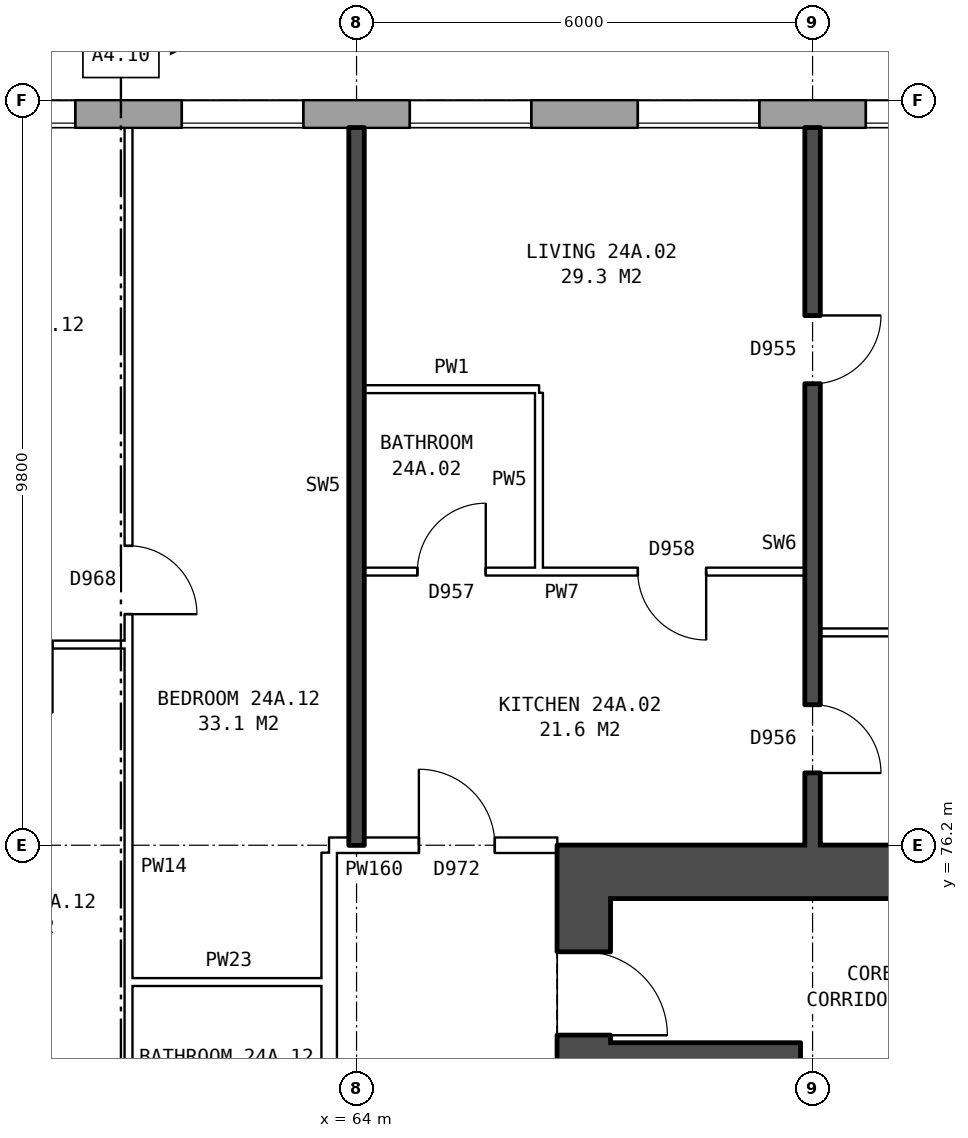
"""IFC4 building model, lengths in metres.
Left out: names, types, materials, properties, quantities, classifications, styles, units other than length and angle.
Written with IfcOpenShell. Run it as: python <this file> out.ifc"""

import sys

from ifc_helpers import new_model, si_unit, direction, frame, frame_2d, origin, place, context, subcontext, project, spatial, rectangle, extrude, element, fill, save


model = new_model("IFC4")
c1 = context("Model", 3, precision=1e-05, world=origin(), true_north=direction((0.0, 1.0)))
c2 = subcontext(c1, "Body", "Model", "MODEL_VIEW")
j1 = project(units=[si_unit("LENGTHUNIT", "METRE"), si_unit("PLANEANGLEUNIT", "RADIAN")], contexts=[c1])
p1 = place(None, origin())
s1 = spatial("IfcSite", under=j1, at=p1, CompositionType="ELEMENT")
p2 = place(p1, origin())
s2 = spatial("IfcBuilding", under=s1, at=p2, CompositionType="ELEMENT")
p3 = place(p2, frame((0.0, 0.0, 87.1)))
s3 = spatial("IfcBuildingStorey", under=s2, at=p3, CompositionType="ELEMENT", Elevation=87.1)
p4 = place(p3, frame((72.925, 85.82, 0.0), z_axis=(0.0, 0.0, 1.0), x_axis=(-1.0, 0.0, 0.0)))
e1 = element("IfcWall", 1, at=p4, inside=s3, PredefinedType="STANDARD", context=c2, shape_type="SweptSolid", body=[
    extrude(rectangle(XDim=46.601, YDim=0.36, at=frame_2d((23.3, 0.0))), origin(), (0.0, 0.0, 1.0), 2.85),
])
p5 = place(p4, frame((0.625, 0.0, 0.8)))
e2 = element("IfcOpeningElement", 2, at=p5, cuts=e1, PredefinedType="OPENING", context=c2, shape_type="SweptSolid", body=[
    extrude(rectangle(XDim=1.6, YDim=1.8, at=frame_2d((0.8, 0.9))), frame((0.0, 0.19, 0.0), z_axis=(0.0, -1.0, 0.0), x_axis=(1.0, 0.0, 0.0)), (0.0, 0.0, 1.0), 0.38),
])
p6 = place(p4, frame((3.625, 0.0, 0.8)))
e3 = element("IfcOpeningElement", 3, at=p6, cuts=e1, PredefinedType="OPENING", context=c2, shape_type="SweptSolid", body=[
    extrude(rectangle(XDim=1.6, YDim=1.8, at=frame_2d((0.8, 0.9))), frame((0.0, 0.19, 0.0), z_axis=(0.0, -1.0, 0.0), x_axis=(1.0, 0.0, 0.0)), (0.0, 0.0, 1.0), 0.38),
])
p7 = place(p4, frame((6.625, 0.0, 0.8)))
e4 = element("IfcOpeningElement", 4, at=p7, cuts=e1, PredefinedType="OPENING", context=c2, shape_type="SweptSolid", body=[
    extrude(rectangle(XDim=1.6, YDim=1.8, at=frame_2d((0.8, 0.9))), frame((0.0, 0.19, 0.0), z_axis=(0.0, -1.0, 0.0), x_axis=(1.0, 0.0, 0.0)), (0.0, 0.0, 1.0), 0.38),
])
p8 = place(p4, frame((9.625, 0.0, 0.8)))
e5 = element("IfcOpeningElement", 5, at=p8, cuts=e1, PredefinedType="OPENING", context=c2, shape_type="SweptSolid", body=[
    extrude(rectangle(XDim=1.6, YDim=1.8, at=frame_2d((0.8, 0.9))), frame((0.0, 0.19, 0.0), z_axis=(0.0, -1.0, 0.0), x_axis=(1.0, 0.0, 0.0)), (0.0, 0.0, 1.0), 0.38),
])
p9 = place(p4, frame((12.625, 0.0, 0.8)))
e6 = element("IfcOpeningElement", 6, at=p9, cuts=e1, PredefinedType="OPENING", context=c2, shape_type="SweptSolid", body=[
    extrude(rectangle(XDim=1.6, YDim=1.8, at=frame_2d((0.8, 0.9))), frame((0.0, 0.19, 0.0), z_axis=(0.0, -1.0, 0.0), x_axis=(1.0, 0.0, 0.0)), (0.0, 0.0, 1.0), 0.38),
])
p10 = place(p4, frame((15.625, 0.0, 0.8)))
e7 = element("IfcOpeningElement", 7, at=p10, cuts=e1, PredefinedType="OPENING", context=c2, shape_type="SweptSolid", body=[
    extrude(rectangle(XDim=1.6, YDim=1.8, at=frame_2d((0.8, 0.9))), frame((0.0, 0.19, 0.0), z_axis=(0.0, -1.0, 0.0), x_axis=(1.0, 0.0, 0.0)), (0.0, 0.0, 1.0), 0.38),
])
p11 = place(p4, frame((18.625, 0.0, 0.8)))
e8 = element("IfcOpeningElement", 8, at=p11, cuts=e1, PredefinedType="OPENING", context=c2, shape_type="SweptSolid", body=[
    extrude(rectangle(XDim=1.6, YDim=1.8, at=frame_2d((0.8, 0.9))), frame((0.0, 0.19, 0.0), z_axis=(0.0, -1.0, 0.0), x_axis=(1.0, 0.0, 0.0)), (0.0, 0.0, 1.0), 0.38),
])
p12 = place(p4, frame((22.025, 0.0, 0.15)))
e9 = element("IfcOpeningElement", 9, at=p12, cuts=e1, PredefinedType="OPENING", context=c2, shape_type="SweptSolid", body=[
    extrude(rectangle(XDim=0.6, YDim=0.9, at=frame_2d((0.3, 0.45))), frame((0.0, 0.19, 0.0), z_axis=(0.0, -1.0, 0.0), x_axis=(1.0, 0.0, 0.0)), (0.0, 0.0, 1.0), 0.38),
])
p13 = place(p4, frame((25.475, 0.0, 1.4)))
e10 = element("IfcOpeningElement", 10, at=p13, cuts=e1, PredefinedType="OPENING", context=c2, shape_type="SweptSolid", body=[
    extrude(rectangle(XDim=1.2, YDim=1.2, at=frame_2d((0.6, 0.6))), frame((0.0, 0.19, 0.0), z_axis=(0.0, -1.0, 0.0), x_axis=(1.0, 0.0, 0.0)), (0.0, 0.0, 1.0), 0.38),
])
p14 = place(p4, frame((27.625, 0.0, 0.8)))
e11 = element("IfcOpeningElement", 11, at=p14, cuts=e1, PredefinedType="OPENING", context=c2, shape_type="SweptSolid", body=[
    extrude(rectangle(XDim=1.6, YDim=1.8, at=frame_2d((0.8, 0.9))), frame((0.0, 0.19, 0.0), z_axis=(0.0, -1.0, 0.0), x_axis=(1.0, 0.0, 0.0)), (0.0, 0.0, 1.0), 0.38),
])
p15 = place(p4, frame((30.625, 0.0, 0.8)))
e12 = element("IfcOpeningElement", 12, at=p15, cuts=e1, PredefinedType="OPENING", context=c2, shape_type="SweptSolid", body=[
    extrude(rectangle(XDim=1.6, YDim=1.8, at=frame_2d((0.8, 0.9))), frame((0.0, 0.19, 0.0), z_axis=(0.0, -1.0, 0.0), x_axis=(1.0, 0.0, 0.0)), (0.0, 0.0, 1.0), 0.38),
])
p16 = place(p4, frame((33.625, 0.0, 0.8)))
e13 = element("IfcOpeningElement", 13, at=p16, cuts=e1, PredefinedType="OPENING", context=c2, shape_type="SweptSolid", body=[
    extrude(rectangle(XDim=1.6, YDim=1.8, at=frame_2d((0.8, 0.9))), frame((0.0, 0.19, 0.0), z_axis=(0.0, -1.0, 0.0), x_axis=(1.0, 0.0, 0.0)), (0.0, 0.0, 1.0), 0.38),
])
p17 = place(p4, frame((36.625, 0.0, 0.8)))
e14 = element("IfcOpeningElement", 14, at=p17, cuts=e1, PredefinedType="OPENING", context=c2, shape_type="SweptSolid", body=[
    extrude(rectangle(XDim=1.6, YDim=1.8, at=frame_2d((0.8, 0.9))), frame((0.0, 0.19, 0.0), z_axis=(0.0, -1.0, 0.0), x_axis=(1.0, 0.0, 0.0)), (0.0, 0.0, 1.0), 0.38),
])
p18 = place(p4, frame((39.625, 0.0, 0.8)))
e15 = element("IfcOpeningElement", 15, at=p18, cuts=e1, PredefinedType="OPENING", context=c2, shape_type="SweptSolid", body=[
    extrude(rectangle(XDim=1.6, YDim=1.8, at=frame_2d((0.8, 0.9))), frame((0.0, 0.19, 0.0), z_axis=(0.0, -1.0, 0.0), x_axis=(1.0, 0.0, 0.0)), (0.0, 0.0, 1.0), 0.38),
])
p19 = place(p4, frame((42.625, 0.0, 0.8)))
e16 = element("IfcOpeningElement", 16, at=p19, cuts=e1, PredefinedType="OPENING", context=c2, shape_type="SweptSolid", body=[
    extrude(rectangle(XDim=1.6, YDim=1.8, at=frame_2d((0.8, 0.9))), frame((0.0, 0.19, 0.0), z_axis=(0.0, -1.0, 0.0), x_axis=(1.0, 0.0, 0.0)), (0.0, 0.0, 1.0), 0.38),
])
p20 = place(p4, frame((22.925, 0.0, 0.25)))
e17 = element("IfcOpeningElement", 17, at=p20, cuts=e1, PredefinedType="OPENING", context=c2, shape_type="SweptSolid", body=[
    extrude(rectangle(XDim=0.8, YDim=1.5, at=frame_2d((0.4, 0.75))), frame((0.0, 0.19, 0.0), z_axis=(0.0, -1.0, 0.0), x_axis=(1.0, 0.0, 0.0)), (0.0, 0.0, 1.0), 0.38),
])
p21 = place(p3, frame((66.99, 64.5, 0.0), z_axis=(0.0, 0.0, 1.0), x_axis=(0.0, 1.0, 0.0)))
e18 = element("IfcWall", 18, at=p21, inside=s3, PredefinedType="SHEAR", context=c2, shape_type="SweptSolid", body=[
    extrude(rectangle(XDim=11.0, YDim=0.7, at=frame_2d((5.5, 0.0))), origin(), (0.0, 0.0, 1.0), 2.85),
])
p22 = place(p21, frame((0.625, 0.0, 0.0)))
e19 = element("IfcOpeningElement", 19, at=p22, cuts=e18, PredefinedType="OPENING", context=c2, shape_type="SweptSolid", body=[
    extrude(rectangle(XDim=1.1, YDim=2.1, at=frame_2d((0.55, 1.05))), frame((0.0, 0.36, 0.0), z_axis=(0.0, -1.0, 0.0), x_axis=(1.0, 0.0, 0.0)), (0.0, 0.0, 1.0), 0.72),
])
p23 = place(p21, frame((9.2, 0.0, 0.0)))
e20 = element("IfcOpeningElement", 20, at=p23, cuts=e18, PredefinedType="OPENING", context=c2, shape_type="SweptSolid", body=[
    extrude(rectangle(XDim=1.1, YDim=2.1, at=frame_2d((0.55, 1.05))), frame((0.0, 0.36, 0.0), z_axis=(0.0, -1.0, 0.0), x_axis=(1.0, 0.0, 0.0)), (0.0, 0.0, 1.0), 0.72),
])
p24 = place(p3, frame((66.64, 75.85, 0.0), z_axis=(0.0, 0.0, 1.0), x_axis=(1.0, 0.0, 0.0)))
e21 = element("IfcWall", 21, at=p24, inside=s3, PredefinedType="SHEAR", context=c2, shape_type="SweptSolid", body=[
    extrude(rectangle(XDim=9.0, YDim=0.7, at=frame_2d((4.5, 0.0))), origin(), (0.0, 0.0, 1.0), 2.85),
])
p25 = place(p3, frame((67.34, 73.45, 0.0), z_axis=(0.0, 0.0, 1.0), x_axis=(1.0, 0.0, 0.0)))
e22 = element("IfcWall", 22, at=p25, inside=s3, PredefinedType="SHEAR", context=c2, shape_type="SweptSolid", body=[
    extrude(rectangle(XDim=2.2, YDim=0.3, at=frame_2d((1.1, 0.0))), origin(), (0.0, 0.0, 1.0), 2.85),
])
p26 = place(p3, frame((69.69, 67.0, 0.0), z_axis=(0.0, 0.0, 1.0), x_axis=(0.0, 1.0, 0.0)))
e23 = element("IfcWall", 23, at=p26, inside=s3, PredefinedType="SHEAR", context=c2, shape_type="SweptSolid", body=[
    extrude(rectangle(XDim=6.6, YDim=0.3, at=frame_2d((3.3, 0.0))), origin(), (0.0, 0.0, 1.0), 2.85),
])
p27 = place(p3, frame((63.64, 63.9, 0.0), z_axis=(0.0, 0.0, 1.0), x_axis=(0.0, 1.0, 0.0)))
e24 = element("IfcWall", 24, at=p27, inside=s3, PredefinedType="PARTITIONING", context=c2, shape_type="SweptSolid", body=[
    extrude(rectangle(XDim=12.2, YDim=0.2, at=frame_2d((6.1, 0.0))), origin(), (0.0, 0.0, 1.0), 2.85),
])
p28 = place(p27, frame((5.1, 0.0, 0.0)))
e25 = element("IfcOpeningElement", 25, at=p28, cuts=e24, PredefinedType="OPENING", context=c2, shape_type="SweptSolid", body=[
    extrude(rectangle(XDim=2.0, YDim=2.1, at=frame_2d((1.0, 1.05))), frame((0.0, 0.11, 0.0), z_axis=(0.0, -1.0, 0.0), x_axis=(1.0, 0.0, 0.0)), (0.0, 0.0, 1.0), 0.22),
])
p29 = place(p3, frame((61.0, 74.4, 0.0), z_axis=(0.0, 0.0, 1.0), x_axis=(1.0, 0.0, 0.0)))
e26 = element("IfcWall", 26, at=p29, inside=s3, PredefinedType="PARTITIONING", context=c2, shape_type="SweptSolid", body=[
    extrude(rectangle(XDim=2.64, YDim=0.1, at=frame_2d((1.32, 0.0))), origin(), (0.0, 0.0, 1.0), 2.85),
])
p30 = place(p3, frame((63.64, 76.2, 0.0), z_axis=(0.0, 0.0, 1.0), x_axis=(1.0, 0.0, 0.0)))
e27 = element("IfcWall", 27, at=p30, inside=s3, PredefinedType="PARTITIONING", context=c2, shape_type="SweptSolid", body=[
    extrude(rectangle(XDim=3.0, YDim=0.2, at=frame_2d((1.5, 0.0))), origin(), (0.0, 0.0, 1.0), 2.85),
])
p31 = place(p30, frame((1.18, 0.0, 0.0)))
e28 = element("IfcOpeningElement", 28, at=p31, cuts=e27, PredefinedType="OPENING", context=c2, shape_type="SweptSolid", body=[
    extrude(rectangle(XDim=1.0, YDim=2.1, at=frame_2d((0.5, 1.05))), frame((0.0, 0.11, 0.0), z_axis=(0.0, -1.0, 0.0), x_axis=(1.0, 0.0, 0.0)), (0.0, 0.0, 1.0), 0.22),
])
p32 = place(p3, frame((58.1, 78.84, 0.0), z_axis=(0.0, 0.0, 1.0), x_axis=(1.0, 0.0, 0.0)))
e29 = element("IfcWall", 29, at=p32, inside=s3, PredefinedType="PARTITIONING", context=c2, shape_type="SweptSolid", body=[
    extrude(rectangle(XDim=2.9, YDim=0.1, at=frame_2d((1.45, 0.0))), origin(), (0.0, 0.0, 1.0), 2.85),
])
p33 = place(p32, frame((1.0, 0.0, 0.0)))
e30 = element("IfcOpeningElement", 30, at=p33, cuts=e29, PredefinedType="OPENING", context=c2, shape_type="SweptSolid", body=[
    extrude(rectangle(XDim=0.9, YDim=2.1, at=frame_2d((0.45, 1.05))), frame((0.0, 0.06, 0.0), z_axis=(0.0, -1.0, 0.0), x_axis=(1.0, 0.0, 0.0)), (0.0, 0.0, 1.0), 0.12),
])
p34 = place(p3, frame((70.1, 79.0, 0.0), z_axis=(0.0, 0.0, 1.0), x_axis=(1.0, 0.0, 0.0)))
e31 = element("IfcWall", 31, at=p34, inside=s3, PredefinedType="PARTITIONING", context=c2, shape_type="SweptSolid", body=[
    extrude(rectangle(XDim=5.54, YDim=0.1, at=frame_2d((2.77, 0.0))), origin(), (0.0, 0.0, 1.0), 2.85),
])
p35 = place(p3, frame((64.1, 79.8, 0.0), z_axis=(0.0, 0.0, 1.0), x_axis=(1.0, 0.0, 0.0)))
e32 = element("IfcWall", 32, at=p35, inside=s3, PredefinedType="PARTITIONING", context=c2, shape_type="SweptSolid", body=[
    extrude(rectangle(XDim=5.8, YDim=0.1, at=frame_2d((2.9, 0.0))), origin(), (0.0, 0.0, 1.0), 2.85),
])
p36 = place(p35, frame((3.6, 0.0, 0.0)))
e33 = element("IfcOpeningElement", 33, at=p36, cuts=e32, PredefinedType="OPENING", context=c2, shape_type="SweptSolid", body=[
    extrude(rectangle(XDim=0.9, YDim=2.1, at=frame_2d((0.45, 1.05))), frame((0.0, 0.06, 0.0), z_axis=(0.0, -1.0, 0.0), x_axis=(1.0, 0.0, 0.0)), (0.0, 0.0, 1.0), 0.12),
])
p37 = place(p35, frame((0.7, 0.0, 0.0)))
e34 = element("IfcOpeningElement", 34, at=p37, cuts=e32, PredefinedType="OPENING", context=c2, shape_type="SweptSolid", body=[
    extrude(rectangle(XDim=0.9, YDim=2.1, at=frame_2d((0.45, 1.05))), frame((0.0, 0.06, 0.0), z_axis=(0.0, -1.0, 0.0), x_axis=(1.0, 0.0, 0.0)), (0.0, 0.0, 1.0), 0.12),
])
p38 = place(p3, frame((64.1, 82.2, 0.0), z_axis=(0.0, 0.0, 1.0), x_axis=(1.0, 0.0, 0.0)))
e35 = element("IfcWall", 35, at=p38, inside=s3, PredefinedType="PARTITIONING", context=c2, shape_type="SweptSolid", body=[
    extrude(rectangle(XDim=2.3, YDim=0.1, at=frame_2d((1.15, 0.0))), origin(), (0.0, 0.0, 1.0), 2.85),
])
p39 = place(p3, frame((61.0, 71.3, 0.0), z_axis=(0.0, 0.0, 1.0), x_axis=(0.0, 1.0, 0.0)))
e36 = element("IfcWall", 36, at=p39, inside=s3, PredefinedType="PARTITIONING", context=c2, shape_type="SweptSolid", body=[
    extrude(rectangle(XDim=14.34, YDim=0.1, at=frame_2d((7.17, 0.0))), origin(), (0.0, 0.0, 1.0), 2.85),
])
p40 = place(p39, frame((7.94, 0.0, 0.0)))
e37 = element("IfcOpeningElement", 37, at=p40, cuts=e36, PredefinedType="OPENING", context=c2, shape_type="SweptSolid", body=[
    extrude(rectangle(XDim=0.9, YDim=2.1, at=frame_2d((0.45, 1.05))), frame((0.0, 0.06, 0.0), z_axis=(0.0, -1.0, 0.0), x_axis=(1.0, 0.0, 0.0)), (0.0, 0.0, 1.0), 0.12),
])
p41 = place(p39, frame((0.4, 0.0, 0.0)))
e38 = element("IfcOpeningElement", 38, at=p41, cuts=e36, PredefinedType="OPENING", context=c2, shape_type="SweptSolid", body=[
    extrude(rectangle(XDim=0.9, YDim=2.1, at=frame_2d((0.45, 1.05))), frame((0.0, 0.06, 0.0), z_axis=(0.0, -1.0, 0.0), x_axis=(1.0, 0.0, 0.0)), (0.0, 0.0, 1.0), 0.12),
])
p42 = place(p3, frame((64.0, 76.2, 0.0), z_axis=(0.0, 0.0, 1.0), x_axis=(0.0, 1.0, 0.0)))
e39 = element("IfcWall", 39, at=p42, inside=s3, PredefinedType="SOLIDWALL", context=c2, shape_type="SweptSolid", body=[
    extrude(rectangle(XDim=9.44, YDim=0.2, at=frame_2d((4.72, 0.0))), origin(), (0.0, 0.0, 1.0), 2.85),
])
p43 = place(p3, frame((66.4, 79.85, 0.0), z_axis=(0.0, 0.0, 1.0), x_axis=(0.0, 1.0, 0.0)))
e40 = element("IfcWall", 40, at=p43, inside=s3, PredefinedType="PARTITIONING", context=c2, shape_type="SweptSolid", body=[
    extrude(rectangle(XDim=2.3, YDim=0.1, at=frame_2d((1.15, 0.0))), origin(), (0.0, 0.0, 1.0), 2.85),
])
p44 = place(p3, frame((70.0, 76.2, 0.0), z_axis=(0.0, 0.0, 1.0), x_axis=(0.0, 1.0, 0.0)))
e41 = element("IfcWall", 41, at=p44, inside=s3, PredefinedType="SOLIDWALL", context=c2, shape_type="SweptSolid", body=[
    extrude(rectangle(XDim=9.44, YDim=0.2, at=frame_2d((4.72, 0.0))), origin(), (0.0, 0.0, 1.0), 2.85),
])
p45 = place(p44, frame((6.07, 0.0, 0.0)))
e42 = element("IfcOpeningElement", 42, at=p45, cuts=e41, PredefinedType="OPENING", context=c2, shape_type="SweptSolid", body=[
    extrude(rectangle(XDim=0.9, YDim=2.1, at=frame_2d((0.45, 1.05))), frame((0.0, 0.11, 0.0), z_axis=(0.0, -1.0, 0.0), x_axis=(1.0, 0.0, 0.0)), (0.0, 0.0, 1.0), 0.22),
])
p46 = place(p44, frame((0.95, 0.0, 0.0)))
e43 = element("IfcOpeningElement", 43, at=p46, cuts=e41, PredefinedType="OPENING", context=c2, shape_type="SweptSolid", body=[
    extrude(rectangle(XDim=0.9, YDim=2.1, at=frame_2d((0.45, 1.05))), frame((0.0, 0.11, 0.0), z_axis=(0.0, -1.0, 0.0), x_axis=(1.0, 0.0, 0.0)), (0.0, 0.0, 1.0), 0.22),
])
p47 = place(p5, origin())
e44 = element("IfcWindow", 44, at=p47, inside=s3, PartitioningType="SINGLE_PANEL", PredefinedType="WINDOW", context=c2, shape_type="SweptSolid", body=[
    extrude(rectangle(XDim=1.6, YDim=1.8, at=frame_2d((0.8, 0.9))), frame((0.0, 0.15, 0.0), z_axis=(0.0, -1.0, 0.0), x_axis=(1.0, 0.0, 0.0)), (0.0, 0.0, 1.0), 0.06),
])
fill(e2, e44)
p48 = place(p6, origin())
e45 = element("IfcWindow", 45, at=p48, inside=s3, PartitioningType="SINGLE_PANEL", PredefinedType="WINDOW", context=c2, shape_type="SweptSolid", body=[
    extrude(rectangle(XDim=1.6, YDim=1.8, at=frame_2d((0.8, 0.9))), frame((0.0, 0.15, 0.0), z_axis=(0.0, -1.0, 0.0), x_axis=(1.0, 0.0, 0.0)), (0.0, 0.0, 1.0), 0.06),
])
fill(e3, e45)
p49 = place(p7, origin())
e46 = element("IfcWindow", 46, at=p49, inside=s3, PartitioningType="SINGLE_PANEL", PredefinedType="WINDOW", context=c2, shape_type="SweptSolid", body=[
    extrude(rectangle(XDim=1.6, YDim=1.8, at=frame_2d((0.8, 0.9))), frame((0.0, 0.15, 0.0), z_axis=(0.0, -1.0, 0.0), x_axis=(1.0, 0.0, 0.0)), (0.0, 0.0, 1.0), 0.06),
])
fill(e4, e46)
p50 = place(p8, origin())
e47 = element("IfcWindow", 47, at=p50, inside=s3, PartitioningType="SINGLE_PANEL", PredefinedType="WINDOW", context=c2, shape_type="SweptSolid", body=[
    extrude(rectangle(XDim=1.6, YDim=1.8, at=frame_2d((0.8, 0.9))), frame((0.0, 0.15, 0.0), z_axis=(0.0, -1.0, 0.0), x_axis=(1.0, 0.0, 0.0)), (0.0, 0.0, 1.0), 0.06),
])
fill(e5, e47)
p51 = place(p9, origin())
e48 = element("IfcWindow", 48, at=p51, inside=s3, PartitioningType="SINGLE_PANEL", PredefinedType="WINDOW", context=c2, shape_type="SweptSolid", body=[
    extrude(rectangle(XDim=1.6, YDim=1.8, at=frame_2d((0.8, 0.9))), frame((0.0, 0.15, 0.0), z_axis=(0.0, -1.0, 0.0), x_axis=(1.0, 0.0, 0.0)), (0.0, 0.0, 1.0), 0.06),
])
fill(e6, e48)
p52 = place(p23, frame((1.1, 0.0, 0.0), z_axis=(0.0, 0.0, 1.0), x_axis=(-1.0, 0.0, 0.0)))
e49 = element("IfcDoor", 49, at=p52, inside=s3, OperationType="SINGLE_SWING_RIGHT", PredefinedType="DOOR", context=c2, shape_type="SweptSolid", body=[
    extrude(rectangle(XDim=1.1, YDim=2.1, at=frame_2d((0.55, 1.05))), frame((0.0, 0.335, 0.0), z_axis=(0.0, -1.0, 0.0), x_axis=(1.0, 0.0, 0.0)), (0.0, 0.0, 1.0), 0.05),
])
fill(e20, e49)
p53 = place(p45, frame((0.9, 0.0, 0.0), z_axis=(0.0, 0.0, 1.0), x_axis=(-1.0, 0.0, 0.0)))
e50 = element("IfcDoor", 50, at=p53, inside=s3, OperationType="SINGLE_SWING_LEFT", PredefinedType="DOOR", context=c2, shape_type="SweptSolid", body=[
    extrude(rectangle(XDim=0.9, YDim=2.1, at=frame_2d((0.45, 1.05))), frame((0.0, 0.025, 0.0), z_axis=(0.0, -1.0, 0.0), x_axis=(1.0, 0.0, 0.0)), (0.0, 0.0, 1.0), 0.05),
])
fill(e42, e50)
p54 = place(p46, frame((0.9, 0.0, 0.0), z_axis=(0.0, 0.0, 1.0), x_axis=(-1.0, 0.0, 0.0)))
e51 = element("IfcDoor", 51, at=p54, inside=s3, OperationType="SINGLE_SWING_RIGHT", PredefinedType="DOOR", context=c2, shape_type="SweptSolid", body=[
    extrude(rectangle(XDim=0.9, YDim=2.1, at=frame_2d((0.45, 1.05))), frame((0.0, 0.025, 0.0), z_axis=(0.0, -1.0, 0.0), x_axis=(1.0, 0.0, 0.0)), (0.0, 0.0, 1.0), 0.05),
])
fill(e43, e51)
p55 = place(p31, origin())
e52 = element("IfcDoor", 52, at=p55, inside=s3, OperationType="SINGLE_SWING_LEFT", PredefinedType="DOOR", context=c2, shape_type="SweptSolid", body=[
    extrude(rectangle(XDim=1.0, YDim=2.1, at=frame_2d((0.5, 1.05))), frame((0.0, 0.025, 0.0), z_axis=(0.0, -1.0, 0.0), x_axis=(1.0, 0.0, 0.0)), (0.0, 0.0, 1.0), 0.05),
])
fill(e28, e52)
p56 = place(p36, frame((0.9, 0.0, 0.0), z_axis=(0.0, 0.0, 1.0), x_axis=(-1.0, 0.0, 0.0)))
e53 = element("IfcDoor", 53, at=p56, inside=s3, OperationType="SINGLE_SWING_LEFT", PredefinedType="DOOR", context=c2, shape_type="SweptSolid", body=[
    extrude(rectangle(XDim=0.9, YDim=2.1, at=frame_2d((0.45, 1.05))), frame((0.0, 0.025, 0.0), z_axis=(0.0, -1.0, 0.0), x_axis=(1.0, 0.0, 0.0)), (0.0, 0.0, 1.0), 0.05),
])
fill(e33, e53)
p57 = place(p37, origin())
e54 = element("IfcDoor", 54, at=p57, inside=s3, OperationType="SINGLE_SWING_RIGHT", PredefinedType="DOOR", context=c2, shape_type="SweptSolid", body=[
    extrude(rectangle(XDim=0.9, YDim=2.1, at=frame_2d((0.45, 1.05))), frame((0.0, 0.025, 0.0), z_axis=(0.0, -1.0, 0.0), x_axis=(1.0, 0.0, 0.0)), (0.0, 0.0, 1.0), 0.05),
])
fill(e34, e54)
p58 = place(p40, frame((0.9, 0.0, 0.0), z_axis=(0.0, 0.0, 1.0), x_axis=(-1.0, 0.0, 0.0)))
e55 = element("IfcDoor", 55, at=p58, inside=s3, OperationType="SINGLE_SWING_RIGHT", PredefinedType="DOOR", context=c2, shape_type="SweptSolid", body=[
    extrude(rectangle(XDim=0.9, YDim=2.1, at=frame_2d((0.45, 1.05))), frame((0.0, 0.025, 0.0), z_axis=(0.0, -1.0, 0.0), x_axis=(1.0, 0.0, 0.0)), (0.0, 0.0, 1.0), 0.05),
])
fill(e37, e55)
save(model, sys.argv[1])
